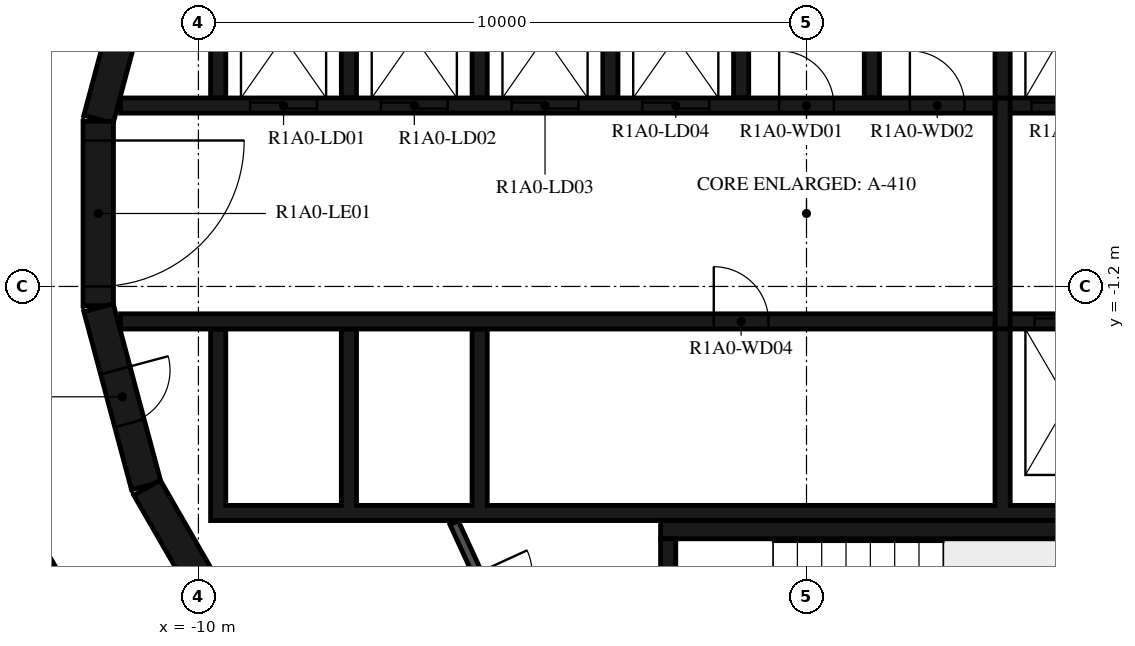
"""IFC4 building model, lengths in metres.
Left out: names, types, materials, properties, quantities, classifications, styles, units other than length and angle.
Written with IfcOpenShell. Run it as: python <this file> out.ifc"""

import sys

from ifc_helpers import new_model, si_unit, direction, frame, frame_2d, origin, place, context, subcontext, project, spatial, polyline, rectangle, outline, extrude, element, fill, save


model = new_model("IFC4")
c1 = context("Model", 3, precision=1e-05, world=origin(), true_north=direction((0.0, 1.0)))
c2 = subcontext(c1, "Body", "Model", "MODEL_VIEW")
j1 = project(units=[si_unit("LENGTHUNIT", "METRE"), si_unit("PLANEANGLEUNIT", "RADIAN")], contexts=[c1])
p1 = place(None, origin())
s1 = spatial("IfcSite", under=j1, at=p1, CompositionType="ELEMENT")
p2 = place(p1, origin())
s2 = spatial("IfcBuilding", under=s1, at=p2, CompositionType="ELEMENT")
p3 = place(p2, frame((0.0, 0.0, 38.4)))
s3 = spatial("IfcBuildingStorey", under=s2, at=p3, CompositionType="ELEMENT", Elevation=38.4)
p4 = place(p3, frame((-10.858, 4.479, 0.0), z_axis=(0.0, 0.0, 1.0), x_axis=(-0.258734743916, -0.965948410781, 0.0)))
e1 = element("IfcWall", 1, at=p4, inside=s3, PredefinedType="SHEAR", context=c2, shape_type="SweptSolid", body=[
    extrude(rectangle(XDim=3.033, YDim=0.5, at=frame_2d((1.516, 0.0))), origin(), (0.0, 0.0, 1.0), 3.12),
])
p5 = place(p3, frame((-11.647, 1.516, 0.0), z_axis=(0.0, 0.0, 1.0), x_axis=(0.0, -1.0, 0.0)))
e2 = element("IfcWall", 2, at=p5, inside=s3, PredefinedType="SHEAR", context=c2, shape_type="SweptSolid", body=[
    extrude(rectangle(XDim=3.033, YDim=0.5, at=frame_2d((1.516, 0.0))), origin(), (0.0, 0.0, 1.0), 3.12),
])
p6 = place(p5, frame((0.316, 0.0, 0.0)))
e3 = element("IfcOpeningElement", 3, at=p6, cuts=e2, PredefinedType="OPENING", context=c2, shape_type="SweptSolid", body=[
    extrude(rectangle(XDim=2.4, YDim=2.1, at=frame_2d((1.2, 1.05))), frame((0.0, 0.26, 0.0), z_axis=(0.0, -1.0, 0.0), x_axis=(1.0, 0.0, 0.0)), (0.0, 0.0, 1.0), 0.52),
])
p7 = place(p3, frame((-11.643, -1.55, 0.0), z_axis=(0.0, 0.0, 1.0), x_axis=(0.258734743916, -0.965948410781, 0.0)))
e4 = element("IfcWall", 4, at=p7, inside=s3, PredefinedType="SHEAR", context=c2, shape_type="SweptSolid", body=[
    extrude(rectangle(XDim=3.033, YDim=0.5, at=frame_2d((1.516, 0.0))), origin(), (0.0, 0.0, 1.0), 3.12),
])
p8 = place(p7, frame((1.066, 0.0, 0.0)))
e5 = element("IfcOpeningElement", 5, at=p8, cuts=e4, PredefinedType="OPENING", context=c2, shape_type="SweptSolid", body=[
    extrude(rectangle(XDim=0.9, YDim=2.1, at=frame_2d((0.45, 1.05))), frame((0.0, 0.26, 0.0), z_axis=(0.0, -1.0, 0.0), x_axis=(1.0, 0.0, 0.0)), (0.0, 0.0, 1.0), 0.52),
])
p9 = place(p3, frame((-10.845, -4.51, 0.0), z_axis=(0.0, 0.0, 1.0), x_axis=(0.500087131594, -0.865975092491, 0.0)))
e6 = element("IfcWall", 6, at=p9, inside=s3, PredefinedType="SHEAR", context=c2, shape_type="SweptSolid", body=[
    extrude(rectangle(XDim=3.033, YDim=0.5, at=frame_2d((1.516, 0.0))), origin(), (0.0, 0.0, 1.0), 3.12),
])
p10 = place(p3, frame((-2.275, -8.67, 0.0), z_axis=(0.0, 0.0, 1.0), x_axis=(0.0, 1.0, 0.0)))
e7 = element("IfcWall", 7, at=p10, inside=s3, PredefinedType="SHEAR", context=c2, shape_type="SweptSolid", body=[
    extrude(rectangle(XDim=3.32, YDim=0.25, at=frame_2d((1.66, 0.0))), origin(), (0.0, 0.0, 1.0), 3.12),
])
p11 = place(p3, frame((-2.4, -5.2, 0.0), z_axis=(0.0, 0.0, 1.0), x_axis=(1.0, 0.0, 0.0)))
e8 = element("IfcWall", 8, at=p11, inside=s3, PredefinedType="SHEAR", context=c2, shape_type="SweptSolid", body=[
    extrude(rectangle(XDim=7.05, YDim=0.3, at=frame_2d((3.525, 0.0))), origin(), (0.0, 0.0, 1.0), 3.12),
])
p12 = place(p3, origin())
e9 = element("IfcWall", 9, at=p12, inside=s3, PredefinedType="SHEAR", context=c2, shape_type="SweptSolid", body=[
    extrude(outline(polyline([(-9.55, 4.8), (-7.65, 4.8), (-7.65, 1.9), (-7.4, 1.9), (-7.4, 4.8), (-5.5, 4.8), (-5.5, 1.9), (-5.25, 1.9), (-5.25, 4.8), (-3.35, 4.8), (-3.35, 1.9), (-3.1, 1.9), (-3.1, 4.8), (-1.2, 4.8), (-1.2, 1.9), (-0.95, 1.9), (-0.95, 4.8), (0.95, 4.8), (0.95, 1.9), (1.2, 1.9), (1.2, 4.8), (3.1, 4.8), (3.1, 1.9), (3.35, 1.9), (3.35, 4.8), (5.25, 4.8), (5.25, 1.9), (5.5, 1.9), (5.5, 4.8), (7.4, 4.8), (7.4, 1.9), (7.65, 1.9), (7.65, 4.8), (9.55, 4.8), (9.55, 1.9), (9.8, 1.9), (9.8, 4.8), (9.8, 5.05), (-9.8, 5.05), (-9.8, 4.8), (-9.8, 1.9), (-9.55, 1.9), (-9.55, 4.8)])), origin(), (0.0, 0.0, 1.0), 3.12),
])
p13 = place(p3, origin())
e10 = element("IfcWall", 10, at=p13, inside=s3, PredefinedType="SHEAR", context=c2, shape_type="SweptSolid", body=[
    extrude(outline(polyline([(9.8, -5.05), (9.8, -4.8), (9.8, -1.9), (9.55, -1.9), (9.55, -4.8), (7.65, -4.8), (7.65, -1.9), (7.4, -1.9), (7.4, -4.8), (5.5, -4.8), (5.5, -1.9), (5.25, -1.9), (5.25, -4.8), (3.35, -4.8), (3.35, -1.9), (3.1, -1.9), (3.1, -4.8), (-5.25, -4.8), (-5.25, -1.9), (-5.5, -1.9), (-5.5, -4.8), (-7.4, -4.8), (-7.4, -1.9), (-7.65, -1.9), (-7.65, -4.8), (-9.55, -4.8), (-9.55, -1.9), (-9.8, -1.9), (-9.8, -4.8), (-9.8, -5.05), (9.8, -5.05)])), origin(), (0.0, 0.0, 1.0), 3.12),
])
p14 = place(p3, frame((-11.28, 1.775, 0.0), z_axis=(0.0, 0.0, 1.0), x_axis=(1.0, 0.0, 0.0)))
e11 = element("IfcWall", 11, at=p14, inside=s3, PredefinedType="SHEAR", context=c2, shape_type="SweptSolid", body=[
    extrude(rectangle(XDim=14.38, YDim=0.25, at=frame_2d((7.19, 0.0))), origin(), (0.0, 0.0, 1.0), 3.12),
])
p15 = place(p14, frame((2.13, 0.0, 0.0)))
e12 = element("IfcOpeningElement", 12, at=p15, cuts=e11, PredefinedType="OPENING", context=c2, shape_type="SweptSolid", body=[
    extrude(rectangle(XDim=1.1, YDim=2.1, at=frame_2d((0.55, 1.05))), frame((0.0, 0.135, 0.0), z_axis=(0.0, -1.0, 0.0), x_axis=(1.0, 0.0, 0.0)), (0.0, 0.0, 1.0), 0.27),
])
p16 = place(p14, frame((4.28, 0.0, 0.0)))
e13 = element("IfcOpeningElement", 13, at=p16, cuts=e11, PredefinedType="OPENING", context=c2, shape_type="SweptSolid", body=[
    extrude(rectangle(XDim=1.1, YDim=2.1, at=frame_2d((0.55, 1.05))), frame((0.0, 0.135, 0.0), z_axis=(0.0, -1.0, 0.0), x_axis=(1.0, 0.0, 0.0)), (0.0, 0.0, 1.0), 0.27),
])
p17 = place(p14, frame((6.43, 0.0, 0.0)))
e14 = element("IfcOpeningElement", 14, at=p17, cuts=e11, PredefinedType="OPENING", context=c2, shape_type="SweptSolid", body=[
    extrude(rectangle(XDim=1.1, YDim=2.1, at=frame_2d((0.55, 1.05))), frame((0.0, 0.135, 0.0), z_axis=(0.0, -1.0, 0.0), x_axis=(1.0, 0.0, 0.0)), (0.0, 0.0, 1.0), 0.27),
])
p18 = place(p14, frame((8.58, 0.0, 0.0)))
e15 = element("IfcOpeningElement", 15, at=p18, cuts=e11, PredefinedType="OPENING", context=c2, shape_type="SweptSolid", body=[
    extrude(rectangle(XDim=1.1, YDim=2.1, at=frame_2d((0.55, 1.05))), frame((0.0, 0.135, 0.0), z_axis=(0.0, -1.0, 0.0), x_axis=(1.0, 0.0, 0.0)), (0.0, 0.0, 1.0), 0.27),
])
p19 = place(p14, frame((10.83, 0.0, 0.0)))
e16 = element("IfcOpeningElement", 16, at=p19, cuts=e11, PredefinedType="OPENING", context=c2, shape_type="SweptSolid", body=[
    extrude(rectangle(XDim=0.9, YDim=2.1, at=frame_2d((0.45, 1.05))), frame((0.0, 0.135, 0.0), z_axis=(0.0, -1.0, 0.0), x_axis=(1.0, 0.0, 0.0)), (0.0, 0.0, 1.0), 0.27),
])
p20 = place(p14, frame((12.98, 0.0, 0.0)))
e17 = element("IfcOpeningElement", 17, at=p20, cuts=e11, PredefinedType="OPENING", context=c2, shape_type="SweptSolid", body=[
    extrude(rectangle(XDim=0.9, YDim=2.1, at=frame_2d((0.45, 1.05))), frame((0.0, 0.135, 0.0), z_axis=(0.0, -1.0, 0.0), x_axis=(1.0, 0.0, 0.0)), (0.0, 0.0, 1.0), 0.27),
])
p21 = place(p3, frame((3.35, 1.775, 0.0), z_axis=(0.0, 0.0, 1.0), x_axis=(1.0, 0.0, 0.0)))
e18 = element("IfcWall", 18, at=p21, inside=s3, PredefinedType="SHEAR", context=c2, shape_type="SweptSolid", body=[
    extrude(rectangle(XDim=7.93, YDim=0.25, at=frame_2d((3.965, 0.0))), origin(), (0.0, 0.0, 1.0), 3.12),
])
p22 = place(p21, frame((0.35, 0.0, 0.0)))
e19 = element("IfcOpeningElement", 19, at=p22, cuts=e18, PredefinedType="OPENING", context=c2, shape_type="SweptSolid", body=[
    extrude(rectangle(XDim=1.2, YDim=2.4, at=frame_2d((0.6, 1.2))), frame((0.0, 0.135, 0.0), z_axis=(0.0, -1.0, 0.0), x_axis=(1.0, 0.0, 0.0)), (0.0, 0.0, 1.0), 0.27),
])
p23 = place(p21, frame((2.5, 0.0, 0.0)))
e20 = element("IfcOpeningElement", 20, at=p23, cuts=e18, PredefinedType="OPENING", context=c2, shape_type="SweptSolid", body=[
    extrude(rectangle(XDim=1.2, YDim=2.4, at=frame_2d((0.6, 1.2))), frame((0.0, 0.135, 0.0), z_axis=(0.0, -1.0, 0.0), x_axis=(1.0, 0.0, 0.0)), (0.0, 0.0, 1.0), 0.27),
])
p24 = place(p21, frame((4.8, 0.0, 0.0)))
e21 = element("IfcOpeningElement", 21, at=p24, cuts=e18, PredefinedType="OPENING", context=c2, shape_type="SweptSolid", body=[
    extrude(rectangle(XDim=0.9, YDim=2.1, at=frame_2d((0.45, 1.05))), frame((0.0, 0.135, 0.0), z_axis=(0.0, -1.0, 0.0), x_axis=(1.0, 0.0, 0.0)), (0.0, 0.0, 1.0), 0.27),
])
p25 = place(p3, frame((-11.28, -1.775, 0.0), z_axis=(0.0, 0.0, 1.0), x_axis=(1.0, 0.0, 0.0)))
e22 = element("IfcWall", 22, at=p25, inside=s3, PredefinedType="SHEAR", context=c2, shape_type="SweptSolid", body=[
    extrude(rectangle(XDim=14.38, YDim=0.25, at=frame_2d((7.19, 0.0))), origin(), (0.0, 0.0, 1.0), 3.12),
])
p26 = place(p25, frame((9.755, 0.0, 0.0)))
e23 = element("IfcOpeningElement", 23, at=p26, cuts=e22, PredefinedType="OPENING", context=c2, shape_type="SweptSolid", body=[
    extrude(rectangle(XDim=0.9, YDim=2.1, at=frame_2d((0.45, 1.05))), frame((0.0, 0.135, 0.0), z_axis=(0.0, -1.0, 0.0), x_axis=(1.0, 0.0, 0.0)), (0.0, 0.0, 1.0), 0.27),
])
p27 = place(p3, frame((3.35, -1.775, 0.0), z_axis=(0.0, 0.0, 1.0), x_axis=(1.0, 0.0, 0.0)))
e24 = element("IfcWall", 24, at=p27, inside=s3, PredefinedType="SHEAR", context=c2, shape_type="SweptSolid", body=[
    extrude(rectangle(XDim=7.93, YDim=0.25, at=frame_2d((3.965, 0.0))), origin(), (0.0, 0.0, 1.0), 3.12),
])
p28 = place(p27, frame((0.4, 0.0, 0.0)))
e25 = element("IfcOpeningElement", 25, at=p28, cuts=e24, PredefinedType="OPENING", context=c2, shape_type="SweptSolid", body=[
    extrude(rectangle(XDim=1.1, YDim=2.4, at=frame_2d((0.55, 1.2))), frame((0.0, 0.135, 0.0), z_axis=(0.0, -1.0, 0.0), x_axis=(1.0, 0.0, 0.0)), (0.0, 0.0, 1.0), 0.27),
])
p29 = place(p27, frame((2.55, 0.0, 0.0)))
e26 = element("IfcOpeningElement", 26, at=p29, cuts=e24, PredefinedType="OPENING", context=c2, shape_type="SweptSolid", body=[
    extrude(rectangle(XDim=1.1, YDim=2.4, at=frame_2d((0.55, 1.2))), frame((0.0, 0.135, 0.0), z_axis=(0.0, -1.0, 0.0), x_axis=(1.0, 0.0, 0.0)), (0.0, 0.0, 1.0), 0.27),
])
p30 = place(p27, frame((4.7, 0.0, 0.0)))
e27 = element("IfcOpeningElement", 27, at=p30, cuts=e24, PredefinedType="OPENING", context=c2, shape_type="SweptSolid", body=[
    extrude(rectangle(XDim=1.1, YDim=2.4, at=frame_2d((0.55, 1.2))), frame((0.0, 0.135, 0.0), z_axis=(0.0, -1.0, 0.0), x_axis=(1.0, 0.0, 0.0)), (0.0, 0.0, 1.0), 0.27),
])
p31 = place(p3, frame((3.225, -1.9, 0.0), z_axis=(0.0, 0.0, 1.0), x_axis=(0.0, 1.0, 0.0)))
e28 = element("IfcWall", 28, at=p31, inside=s3, PredefinedType="SHEAR", context=c2, shape_type="SweptSolid", body=[
    extrude(rectangle(XDim=3.8, YDim=0.25, at=frame_2d((1.9, 0.0))), origin(), (0.0, 0.0, 1.0), 3.12),
])
p32 = place(p3, frame((-5.795, -5.086, 0.0), z_axis=(0.0, 0.0, 1.0), x_axis=(0.417887867606, -0.908498613157, 0.0)))
e29 = element("IfcWall", 29, at=p32, inside=s3, PredefinedType="PARTITIONING", context=c2, shape_type="SweptSolid", body=[
    extrude(rectangle(XDim=2.726, YDim=0.15, at=frame_2d((1.363, 0.0))), origin(), (0.0, 0.0, 1.0), 3.12),
])
p33 = place(p32, frame((0.913, 0.0, 0.0)))
e30 = element("IfcOpeningElement", 30, at=p33, cuts=e29, PredefinedType="OPENING", context=c2, shape_type="SweptSolid", body=[
    extrude(rectangle(XDim=0.9, YDim=2.1, at=frame_2d((0.45, 1.05))), frame((0.0, 0.085, 0.0), z_axis=(0.0, -1.0, 0.0), x_axis=(1.0, 0.0, 0.0)), (0.0, 0.0, 1.0), 0.17),
])
p34 = place(p3, frame((-13.7, -3.671, 0.0), z_axis=(0.0, 0.0, 1.0), x_axis=(0.500001669485, -0.866024439905, 0.0)))
e31 = element("IfcWall", 31, at=p34, inside=s3, PredefinedType="STANDARD", context=c2, shape_type="SweptSolid", body=[
    extrude(rectangle(XDim=7.342, YDim=0.2, at=frame_2d((3.671, 0.0))), origin(), (0.0, 0.0, 1.0), 3.12),
])
p35 = place(p6, origin())
e32 = element("IfcDoor", 32, at=p35, inside=s3, OperationType="DOUBLE_DOOR_SINGLE_SWING", PredefinedType="DOOR", context=c2, shape_type="SweptSolid", body=[
    extrude(rectangle(XDim=2.4, YDim=2.1, at=frame_2d((1.2, 1.05))), frame((0.0, 0.025, 0.0), z_axis=(0.0, -1.0, 0.0), x_axis=(1.0, 0.0, 0.0)), (0.0, 0.0, 1.0), 0.05),
])
fill(e3, e32)
p36 = place(p15, origin())
e33 = element("IfcDoor", 33, at=p36, inside=s3, OperationType="DOUBLE_DOOR_SLIDING", PredefinedType="DOOR", context=c2, shape_type="SweptSolid", body=[
    extrude(rectangle(XDim=1.1, YDim=2.1, at=frame_2d((0.55, 1.05))), frame((0.0, 0.025, 0.0), z_axis=(0.0, -1.0, 0.0), x_axis=(1.0, 0.0, 0.0)), (0.0, 0.0, 1.0), 0.05),
])
fill(e12, e33)
p37 = place(p16, origin())
e34 = element("IfcDoor", 34, at=p37, inside=s3, OperationType="DOUBLE_DOOR_SLIDING", PredefinedType="DOOR", context=c2, shape_type="SweptSolid", body=[
    extrude(rectangle(XDim=1.1, YDim=2.1, at=frame_2d((0.55, 1.05))), frame((0.0, 0.025, 0.0), z_axis=(0.0, -1.0, 0.0), x_axis=(1.0, 0.0, 0.0)), (0.0, 0.0, 1.0), 0.05),
])
fill(e13, e34)
p38 = place(p17, origin())
e35 = element("IfcDoor", 35, at=p38, inside=s3, OperationType="DOUBLE_DOOR_SLIDING", PredefinedType="DOOR", context=c2, shape_type="SweptSolid", body=[
    extrude(rectangle(XDim=1.1, YDim=2.1, at=frame_2d((0.55, 1.05))), frame((0.0, 0.025, 0.0), z_axis=(0.0, -1.0, 0.0), x_axis=(1.0, 0.0, 0.0)), (0.0, 0.0, 1.0), 0.05),
])
fill(e14, e35)
p39 = place(p18, origin())
e36 = element("IfcDoor", 36, at=p39, inside=s3, OperationType="DOUBLE_DOOR_SLIDING", PredefinedType="DOOR", context=c2, shape_type="SweptSolid", body=[
    extrude(rectangle(XDim=1.1, YDim=2.1, at=frame_2d((0.55, 1.05))), frame((0.0, 0.025, 0.0), z_axis=(0.0, -1.0, 0.0), x_axis=(1.0, 0.0, 0.0)), (0.0, 0.0, 1.0), 0.05),
])
fill(e15, e36)
p40 = place(p22, origin())
e37 = element("IfcDoor", 37, at=p40, inside=s3, OperationType="DOUBLE_DOOR_SLIDING", PredefinedType="DOOR", context=c2, shape_type="SweptSolid", body=[
    extrude(rectangle(XDim=1.2, YDim=2.4, at=frame_2d((0.6, 1.2))), frame((0.0, 0.025, 0.0), z_axis=(0.0, -1.0, 0.0), x_axis=(1.0, 0.0, 0.0)), (0.0, 0.0, 1.0), 0.05),
])
fill(e19, e37)
p41 = place(p28, origin())
e38 = element("IfcDoor", 38, at=p41, inside=s3, OperationType="DOUBLE_DOOR_SLIDING", PredefinedType="DOOR", context=c2, shape_type="SweptSolid", body=[
    extrude(rectangle(XDim=1.1, YDim=2.4, at=frame_2d((0.55, 1.2))), frame((0.0, 0.025, 0.0), z_axis=(0.0, -1.0, 0.0), x_axis=(1.0, 0.0, 0.0)), (0.0, 0.0, 1.0), 0.05),
])
fill(e25, e38)
p42 = place(p19, origin())
e39 = element("IfcDoor", 39, at=p42, inside=s3, OperationType="SINGLE_SWING_RIGHT", PredefinedType="DOOR", context=c2, shape_type="SweptSolid", body=[
    extrude(rectangle(XDim=0.9, YDim=2.1, at=frame_2d((0.45, 1.05))), frame((0.0, 0.025, 0.0), z_axis=(0.0, -1.0, 0.0), x_axis=(1.0, 0.0, 0.0)), (0.0, 0.0, 1.0), 0.05),
])
fill(e16, e39)
p43 = place(p20, origin())
e40 = element("IfcDoor", 40, at=p43, inside=s3, OperationType="SINGLE_SWING_LEFT", PredefinedType="DOOR", context=c2, shape_type="SweptSolid", body=[
    extrude(rectangle(XDim=0.9, YDim=2.1, at=frame_2d((0.45, 1.05))), frame((0.0, 0.025, 0.0), z_axis=(0.0, -1.0, 0.0), x_axis=(1.0, 0.0, 0.0)), (0.0, 0.0, 1.0), 0.05),
])
fill(e17, e40)
p44 = place(p26, origin())
e41 = element("IfcDoor", 41, at=p44, inside=s3, OperationType="SINGLE_SWING_LEFT", PredefinedType="DOOR", context=c2, shape_type="SweptSolid", body=[
    extrude(rectangle(XDim=0.9, YDim=2.1, at=frame_2d((0.45, 1.05))), frame((0.0, 0.025, 0.0), z_axis=(0.0, -1.0, 0.0), x_axis=(1.0, 0.0, 0.0)), (0.0, 0.0, 1.0), 0.05),
])
fill(e23, e41)
p45 = place(p8, origin())
e42 = element("IfcDoor", 42, at=p45, inside=s3, OperationType="SINGLE_SWING_RIGHT", PredefinedType="DOOR", context=c2, shape_type="SweptSolid", body=[
    extrude(rectangle(XDim=0.9, YDim=2.1, at=frame_2d((0.45, 1.05))), frame((0.0, 0.025, 0.0), z_axis=(0.0, -1.0, 0.0), x_axis=(1.0, 0.0, 0.0)), (0.0, 0.0, 1.0), 0.05),
])
fill(e5, e42)
save(model, sys.argv[1])
